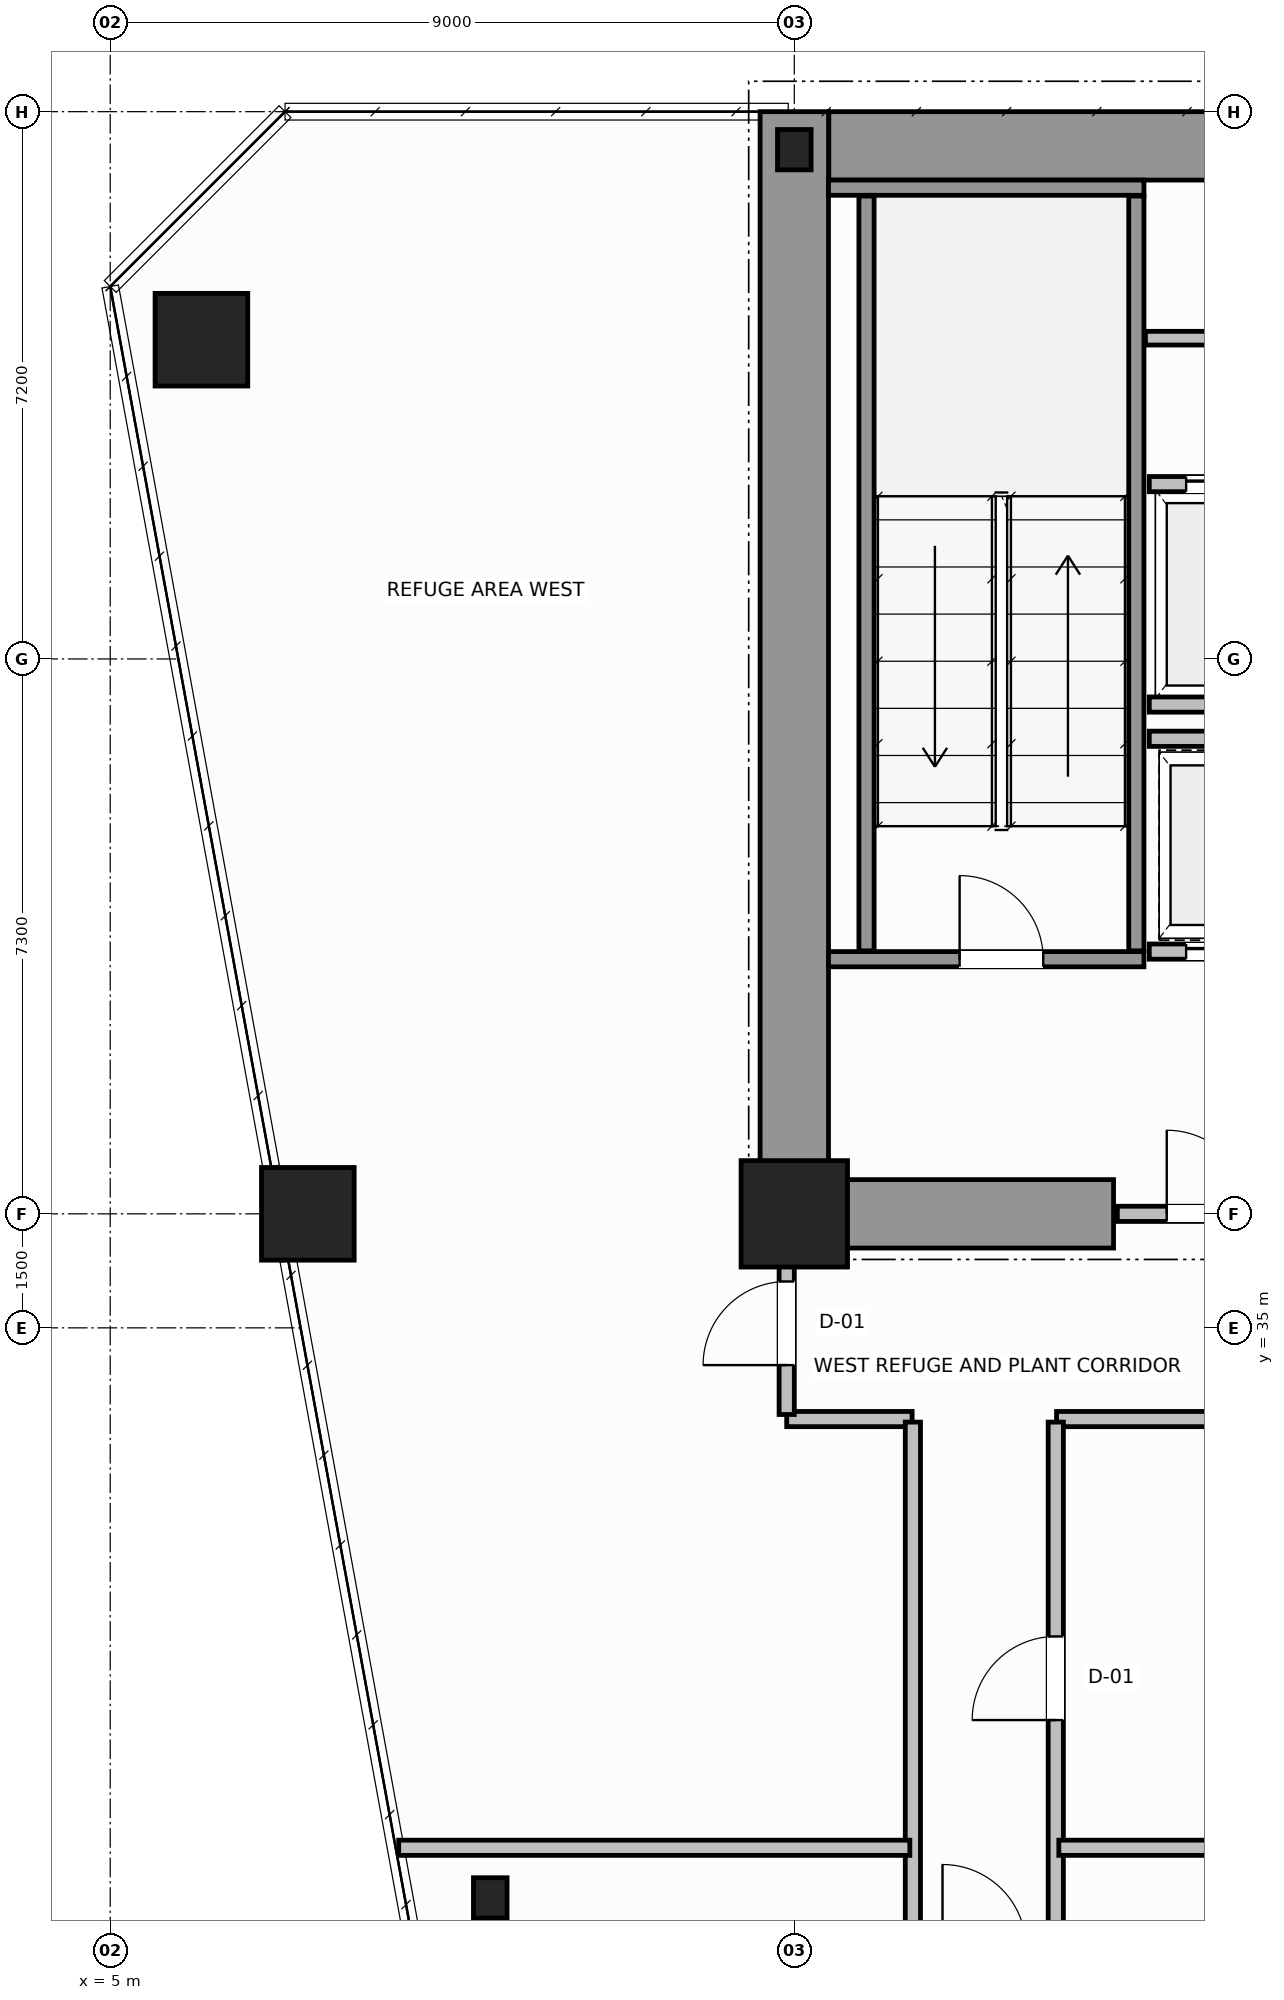
"""IFC4 building model, lengths in metres.
Left out: names, types, materials, properties, quantities, classifications, styles, units other than length and angle.
Written with IfcOpenShell. Run it as: python <this file> out.ifc"""

import sys

from ifc_helpers import new_model, si_unit, direction, frame, frame_2d, origin, origin_2d, place, context, subcontext, project, spatial, rectangle, hollow_circle, i_section, extrude, source, transform, mapped, element, fill, save


model = new_model("IFC4")
c1 = context("Model", 3, precision=1e-05, world=origin(), true_north=direction((0.0, 1.0)))
c2 = subcontext(c1, "Body", "Model", "MODEL_VIEW")
j1 = project(units=[si_unit("LENGTHUNIT", "METRE"), si_unit("PLANEANGLEUNIT", "RADIAN")], contexts=[c1])
p1 = place(None, origin())
s1 = spatial("IfcSite", under=j1, at=p1, CompositionType="ELEMENT")
p2 = place(p1, origin())
s2 = spatial("IfcBuilding", under=s1, at=p2, CompositionType="ELEMENT")
p3 = place(p2, frame((0.0, 0.0, 83.4)))
s3 = spatial("IfcBuildingStorey", under=s2, at=p3, CompositionType="ELEMENT", Elevation=83.4)
m1 = source(origin(), c2, "Body", "SweptSolid", [
    extrude(rectangle(XDim=1.4, YDim=1.4, at=origin_2d()), origin(), (0.0, 0.0, 1.0), 4.8),
])
p4 = place(p3, frame((14.0, 36.5, 0.0), z_axis=(0.0, 0.0, 1.0), x_axis=(1.0, 0.0, 0.0)))
e1 = element("IfcColumn", 1, at=p4, inside=s3, PredefinedType="COLUMN", context=c2, shape_type="MappedRepresentation", body=[
    mapped(m1, transform((0.0, 0.0, 0.0), scale=1.0)),
])
m2 = source(origin(), c2, "Body", "SweptSolid", [
    extrude(i_section(OverallWidth=0.442, OverallDepth=0.531, WebThickness=0.065, FlangeThickness=0.076, FilletRadius=0.015, at=origin_2d()), origin(), (0.0, 0.0, 1.0), 4.8),
])
p5 = place(p3, frame((14.0, 50.5, 0.0), z_axis=(0.0, 0.0, 1.0), x_axis=(1.0, 0.0, 0.0)))
e2 = element("IfcColumn", 2, at=p5, inside=s3, PredefinedType="COLUMN", context=c2, shape_type="MappedRepresentation", body=[
    mapped(m2, transform((0.0, 0.0, 0.0), scale=1.0)),
])
m3 = source(origin(), c2, "Body", "SweptSolid", [
    extrude(hollow_circle(Radius=0.61, WallThickness=0.05, at=origin_2d()), origin(), (0.0, 0.0, 1.0), 4.8),
])
for number, where, z_axis, x_axis in (
    (3, (6.2, 48.0, 0.0), (0.0, 0.0, 1.0), (1.0, 0.0, 0.0)),
    (4, (7.6, 36.5, 0.0), (0.0, 0.0, 1.0), (1.0, 0.0, 0.0)),
):
    element("IfcColumn", number, at=place(p3, frame(where, z_axis=z_axis, x_axis=x_axis)), inside=s3, PredefinedType="COLUMN", context=c2, shape_type="MappedRepresentation", body=[
        mapped(m3, transform((0.0, 0.0, 0.0), scale=1.0)),
    ])
m4 = source(origin(), c2, "Body", "SweptSolid", [
    extrude(i_section(OverallWidth=0.442, OverallDepth=0.531, WebThickness=0.065, FlangeThickness=0.076, FilletRadius=0.015, at=origin_2d()), origin(), (0.0, 0.0, 1.0), 4.8),
])
p6 = place(p3, frame((10.0, 27.5, 0.0), z_axis=(0.0, 0.0, 1.0), x_axis=(1.0, 0.0, 0.0)))
e5 = element("IfcColumn", 5, at=p6, inside=s3, PredefinedType="COLUMN", context=c2, shape_type="MappedRepresentation", body=[
    mapped(m4, transform((0.0, 0.0, 0.0), scale=1.0)),
])
p7 = place(p3, frame((14.454, 50.55, 0.0), z_axis=(0.0, 0.0, 1.0), x_axis=(1.0, 0.0, 0.0)))
e6 = element("IfcWall", 6, at=p7, inside=s3, PredefinedType="SHEAR", context=c2, shape_type="SweptSolid", body=[
    extrude(rectangle(XDim=19.544, YDim=0.9, at=frame_2d((9.772, 0.0))), origin(), (0.0, 0.0, 1.0), 4.8),
])
p8 = place(p3, frame((14.0, 36.5, 0.0), z_axis=(0.0, 0.0, 1.0), x_axis=(0.0, 1.0, 0.0)))
e7 = element("IfcWall", 7, at=p8, inside=s3, PredefinedType="SHEAR", context=c2, shape_type="SweptSolid", body=[
    extrude(rectangle(XDim=14.5, YDim=0.9, at=frame_2d((7.25, 0.0))), origin(), (0.0, 0.0, 1.0), 4.8),
])
p9 = place(p3, frame((14.47, 36.5, 0.0), z_axis=(0.0, 0.0, 1.0), x_axis=(1.0, 0.0, 0.0)))
e8 = element("IfcWall", 8, at=p9, inside=s3, PredefinedType="SHEAR", context=c2, shape_type="SweptSolid", body=[
    extrude(rectangle(XDim=3.73, YDim=0.9, at=frame_2d((1.865, 0.0))), origin(), (0.0, 0.0, 1.0), 3.34),
])
p10 = place(p3, frame((14.45, 39.85, 0.0), z_axis=(0.0, 0.0, 1.0), x_axis=(1.0, 0.0, 0.0)))
e9 = element("IfcWall", 9, at=p10, inside=s3, PredefinedType="SOLIDWALL", context=c2, shape_type="SweptSolid", body=[
    extrude(rectangle(XDim=4.15, YDim=0.2, at=frame_2d((2.075, 0.0))), origin(), (0.0, 0.0, 1.0), 4.8),
])
p11 = place(p10, frame((1.725, 0.0, 0.0)))
e10 = element("IfcOpeningElement", 10, at=p11, cuts=e9, PredefinedType="OPENING", context=c2, shape_type="SweptSolid", body=[
    extrude(rectangle(XDim=1.1, YDim=2.15, at=frame_2d((0.55, 1.075))), frame((0.0, 0.11, 0.0), z_axis=(0.0, -1.0, 0.0), x_axis=(1.0, 0.0, 0.0)), (0.0, 0.0, 1.0), 0.22),
])
p12 = place(p3, frame((14.45, 50.0, 0.0), z_axis=(0.0, 0.0, 1.0), x_axis=(1.0, 0.0, 0.0)))
e11 = element("IfcWall", 11, at=p12, inside=s3, PredefinedType="SOLIDWALL", context=c2, shape_type="SweptSolid", body=[
    extrude(rectangle(XDim=4.15, YDim=0.2, at=frame_2d((2.075, 0.0))), origin(), (0.0, 0.0, 1.0), 4.8),
])
for number, where, z_axis, x_axis in (
    (12, (14.95, 39.96, 0.0), (0.0, 0.0, 1.0), (0.0, 1.0, 0.0)),
    (13, (18.5, 39.96, 0.0), (0.0, 0.0, 1.0), (0.0, 1.0, 0.0)),
):
    element("IfcWall", number, at=place(p3, frame(where, z_axis=z_axis, x_axis=x_axis)), inside=s3, PredefinedType="SOLIDWALL", context=c2, shape_type="SweptSolid", body=[
        extrude(rectangle(XDim=9.93, YDim=0.2, at=frame_2d((4.965, 0.0))), origin(), (0.0, 0.0, 1.0), 4.8),
    ])
p13 = place(p3, frame((18.25, 36.5, 0.0), z_axis=(0.0, 0.0, 1.0), x_axis=(1.0, 0.0, 0.0)))
e14 = element("IfcWall", 14, at=p13, inside=s3, PredefinedType="SOLIDWALL", context=c2, shape_type="SweptSolid", body=[
    extrude(rectangle(XDim=2.47, YDim=0.2, at=frame_2d((1.235, 0.0))), origin(), (0.0, 0.0, 1.0), 3.33),
])
p14 = place(p13, frame((0.65, 0.0, 0.0)))
e15 = element("IfcOpeningElement", 15, at=p14, cuts=e14, PredefinedType="OPENING", context=c2, shape_type="SweptSolid", body=[
    extrude(rectangle(XDim=1.1, YDim=2.15, at=frame_2d((0.55, 1.075))), frame((0.0, 0.11, 0.0), z_axis=(0.0, -1.0, 0.0), x_axis=(1.0, 0.0, 0.0)), (0.0, 0.0, 1.0), 0.22),
])
p15 = place(p3, frame((18.67, 46.1, 0.0), z_axis=(0.0, 0.0, 1.0), x_axis=(1.0, 0.0, 0.0)))
e16 = element("IfcWall", 16, at=p15, inside=s3, PredefinedType="SOLIDWALL", context=c2, shape_type="SweptSolid", body=[
    extrude(rectangle(XDim=2.07, YDim=0.2, at=frame_2d((1.035, 0.0))), origin(), (0.0, 0.0, 1.0), 4.54),
])
p16 = place(p15, frame((0.485, 0.0, 0.0)))
e17 = element("IfcOpeningElement", 17, at=p16, cuts=e16, PredefinedType="OPENING", context=c2, shape_type="SweptSolid", body=[
    extrude(rectangle(XDim=1.1, YDim=2.15, at=frame_2d((0.55, 1.075))), frame((0.0, 0.11, 0.0), z_axis=(0.0, -1.0, 0.0), x_axis=(1.0, 0.0, 0.0)), (0.0, 0.0, 1.0), 0.22),
])
p17 = place(p3, frame((18.67, 43.2, 0.0), z_axis=(0.0, 0.0, 1.0), x_axis=(1.0, 0.0, 0.0)))
e18 = element("IfcWall", 18, at=p17, inside=s3, PredefinedType="SOLIDWALL", context=c2, shape_type="SweptSolid", body=[
    extrude(rectangle(XDim=2.07, YDim=0.2, at=frame_2d((1.035, 0.0))), origin(), (0.0, 0.0, 1.0), 4.54),
])
p18 = place(p3, frame((18.67, 39.95, 0.0), z_axis=(0.0, 0.0, 1.0), x_axis=(1.0, 0.0, 0.0)))
e19 = element("IfcWall", 19, at=p18, inside=s3, PredefinedType="SOLIDWALL", context=c2, shape_type="SweptSolid", body=[
    extrude(rectangle(XDim=2.07, YDim=0.2, at=frame_2d((1.035, 0.0))), origin(), (0.0, 0.0, 1.0), 4.54),
])
p19 = place(p18, frame((0.485, 0.0, 0.0)))
e20 = element("IfcOpeningElement", 20, at=p19, cuts=e19, PredefinedType="OPENING", context=c2, shape_type="SweptSolid", body=[
    extrude(rectangle(XDim=1.1, YDim=2.15, at=frame_2d((0.55, 1.075))), frame((0.0, 0.11, 0.0), z_axis=(0.0, -1.0, 0.0), x_axis=(1.0, 0.0, 0.0)), (0.0, 0.0, 1.0), 0.22),
])
p20 = place(p3, frame((18.67, 42.75, 0.0), z_axis=(0.0, 0.0, 1.0), x_axis=(1.0, 0.0, 0.0)))
e21 = element("IfcWall", 21, at=p20, inside=s3, PredefinedType="SOLIDWALL", context=c2, shape_type="SweptSolid", body=[
    extrude(rectangle(XDim=2.07, YDim=0.2, at=frame_2d((1.035, 0.0))), origin(), (0.0, 0.0, 1.0), 4.54),
])
p21 = place(p3, frame((18.62, 48.02, 0.0), z_axis=(0.0, 0.0, 1.0), x_axis=(1.0, 0.0, 0.0)))
e22 = element("IfcWall", 22, at=p21, inside=s3, PredefinedType="PLUMBINGWALL", context=c2, shape_type="SweptSolid", body=[
    extrude(rectangle(XDim=30.76, YDim=0.18, at=frame_2d((15.38, 0.0))), origin(), (0.0, 0.0, 1.0), 4.54),
])
p22 = place(p21, frame((1.955, 0.0, 0.0)))
e23 = element("IfcOpeningElement", 23, at=p22, cuts=e22, PredefinedType="OPENING", context=c2, shape_type="SweptSolid", body=[
    extrude(rectangle(XDim=0.9, YDim=2.15, at=frame_2d((0.45, 1.075))), frame((0.0, 0.1, 0.0), z_axis=(0.0, -1.0, 0.0), x_axis=(1.0, 0.0, 0.0)), (0.0, 0.0, 1.0), 0.2),
])
p23 = place(p21, frame((8.03, 0.0, 0.0)))
e24 = element("IfcOpeningElement", 24, at=p23, cuts=e22, PredefinedType="OPENING", context=c2, shape_type="SweptSolid", body=[
    extrude(rectangle(XDim=0.9, YDim=2.15, at=frame_2d((0.45, 1.075))), frame((0.0, 0.1, 0.0), z_axis=(0.0, -1.0, 0.0), x_axis=(1.0, 0.0, 0.0)), (0.0, 0.0, 1.0), 0.2),
])
p24 = place(p21, frame((16.93, 0.0, 0.0)))
e25 = element("IfcOpeningElement", 25, at=p24, cuts=e22, PredefinedType="OPENING", context=c2, shape_type="SweptSolid", body=[
    extrude(rectangle(XDim=0.9, YDim=2.15, at=frame_2d((0.45, 1.075))), frame((0.0, 0.1, 0.0), z_axis=(0.0, -1.0, 0.0), x_axis=(1.0, 0.0, 0.0)), (0.0, 0.0, 1.0), 0.2),
])
p25 = place(p21, frame((26.205, 0.0, 0.0)))
e26 = element("IfcOpeningElement", 26, at=p25, cuts=e22, PredefinedType="OPENING", context=c2, shape_type="SweptSolid", body=[
    extrude(rectangle(XDim=0.9, YDim=2.15, at=frame_2d((0.45, 1.075))), frame((0.0, 0.1, 0.0), z_axis=(0.0, -1.0, 0.0), x_axis=(1.0, 0.0, 0.0)), (0.0, 0.0, 1.0), 0.2),
])
p26 = place(p3, frame((13.9, 33.8, 0.0), z_axis=(0.0, 0.0, 1.0), x_axis=(1.0, 0.0, 0.0)))
e27 = element("IfcWall", 27, at=p26, inside=s3, PredefinedType="SOLIDWALL", context=c2, shape_type="SweptSolid", body=[
    extrude(rectangle(XDim=1.65, YDim=0.2, at=frame_2d((0.825, 0.0))), origin(), (0.0, 0.0, 1.0), 4.03),
])
p27 = place(p3, frame((17.45, 33.8, 0.0), z_axis=(0.0, 0.0, 1.0), x_axis=(1.0, 0.0, 0.0)))
e28 = element("IfcWall", 28, at=p27, inside=s3, PredefinedType="SOLIDWALL", context=c2, shape_type="SweptSolid", body=[
    extrude(rectangle(XDim=10.91, YDim=0.2, at=frame_2d((5.455, 0.0))), origin(), (0.0, 0.0, 1.0), 4.03),
])
p28 = place(p27, frame((8.01, 0.0, 0.0)))
e29 = element("IfcOpeningElement", 29, at=p28, cuts=e28, PredefinedType="OPENING", context=c2, shape_type="SweptSolid", body=[
    extrude(rectangle(XDim=1.1, YDim=2.15, at=frame_2d((0.55, 1.075))), frame((0.0, 0.11, 0.0), z_axis=(0.0, -1.0, 0.0), x_axis=(1.0, 0.0, 0.0)), (0.0, 0.0, 1.0), 0.22),
])
p29 = place(p3, frame((13.9, 33.86, 0.0), z_axis=(0.0, 0.0, 1.0), x_axis=(0.0, 1.0, 0.0)))
e30 = element("IfcWall", 30, at=p29, inside=s3, PredefinedType="SOLIDWALL", context=c2, shape_type="SweptSolid", body=[
    extrude(rectangle(XDim=2.58, YDim=0.2, at=frame_2d((1.29, 0.0))), origin(), (0.0, 0.0, 1.0), 4.54),
])
p30 = place(p29, frame((0.65, 0.0, 0.0)))
e31 = element("IfcOpeningElement", 31, at=p30, cuts=e30, PredefinedType="OPENING", context=c2, shape_type="SweptSolid", body=[
    extrude(rectangle(XDim=1.1, YDim=2.15, at=frame_2d((0.55, 1.075))), frame((0.0, 0.11, 0.0), z_axis=(0.0, -1.0, 0.0), x_axis=(1.0, 0.0, 0.0)), (0.0, 0.0, 1.0), 0.22),
])
p31 = place(p3, frame((15.56, 26.84, 0.0), z_axis=(0.0, 0.0, 1.0), x_axis=(0.0, 1.0, 0.0)))
e32 = element("IfcWall", 32, at=p31, inside=s3, PredefinedType="SOLIDWALL", context=c2, shape_type="SweptSolid", body=[
    extrude(rectangle(XDim=6.92, YDim=0.2, at=frame_2d((3.46, 0.0))), origin(), (0.0, 0.0, 1.0), 4.54),
])
p32 = place(p3, frame((17.44, 26.84, 0.0), z_axis=(0.0, 0.0, 1.0), x_axis=(0.0, 1.0, 0.0)))
e33 = element("IfcWall", 33, at=p32, inside=s3, PredefinedType="SOLIDWALL", context=c2, shape_type="SweptSolid", body=[
    extrude(rectangle(XDim=6.92, YDim=0.2, at=frame_2d((3.46, 0.0))), origin(), (0.0, 0.0, 1.0), 4.54),
])
p33 = place(p32, frame((3.0, 0.0, 0.0)))
e34 = element("IfcOpeningElement", 34, at=p33, cuts=e33, PredefinedType="OPENING", context=c2, shape_type="SweptSolid", body=[
    extrude(rectangle(XDim=1.1, YDim=2.15, at=frame_2d((0.55, 1.075))), frame((0.0, 0.11, 0.0), z_axis=(0.0, -1.0, 0.0), x_axis=(1.0, 0.0, 0.0)), (0.0, 0.0, 1.0), 0.22),
])
p34 = place(p3, frame((8.795, 28.16, 0.0), z_axis=(0.0, 0.0, 1.0), x_axis=(1.0, 0.0, 0.0)))
e35 = element("IfcWall", 35, at=p34, inside=s3, PredefinedType="SOLIDWALL", context=c2, shape_type="SweptSolid", body=[
    extrude(rectangle(XDim=6.725, YDim=0.2, at=frame_2d((3.362, 0.0))), origin(), (0.0, 0.0, 1.0), 4.54),
])
p35 = place(p3, frame((17.48, 28.16, 0.0), z_axis=(0.0, 0.0, 1.0), x_axis=(1.0, 0.0, 0.0)))
e36 = element("IfcWall", 36, at=p35, inside=s3, PredefinedType="SOLIDWALL", context=c2, shape_type="SweptSolid", body=[
    extrude(rectangle(XDim=33.04, YDim=0.2, at=frame_2d((16.52, 0.0))), origin(), (0.0, 0.0, 1.0), 4.54),
])
m5 = source(origin(), c2, "Body", "SweptSolid", [
    extrude(rectangle(XDim=1.1, YDim=2.15, at=frame_2d((0.55, 1.075))), frame((0.0, 0.025, 0.0), z_axis=(0.0, -1.0, 0.0), x_axis=(1.0, 0.0, 0.0)), (0.0, 0.0, 1.0), 0.05),
])
p36 = place(p11, origin())
e37 = element("IfcDoor", 37, at=p36, inside=s3, OperationType="SINGLE_SWING_LEFT", PredefinedType="DOOR", context=c2, shape_type="MappedRepresentation", body=[
    mapped(m5, transform((0.0, 0.0, 0.0), scale=1.0)),
])
fill(e10, e37)
p37 = place(p14, origin())
e38 = element("IfcDoor", 38, at=p37, inside=s3, OperationType="SINGLE_SWING_RIGHT", PredefinedType="DOOR", context=c2, shape_type="MappedRepresentation", body=[
    mapped(m5, transform((0.0, 0.0, 0.0), scale=1.0)),
])
fill(e15, e38)
p38 = place(p16, origin())
e39 = element("IfcDoor", 39, at=p38, inside=s3, OperationType="DOUBLE_DOOR_SLIDING", PredefinedType="DOOR", context=c2, shape_type="MappedRepresentation", body=[
    mapped(m5, transform((0.0, 0.0, 0.0), scale=1.0)),
])
fill(e17, e39)
p39 = place(p19, origin())
e40 = element("IfcDoor", 40, at=p39, inside=s3, OperationType="DOUBLE_DOOR_SLIDING", PredefinedType="DOOR", context=c2, shape_type="MappedRepresentation", body=[
    mapped(m5, transform((0.0, 0.0, 0.0), scale=1.0)),
])
fill(e20, e40)
p40 = place(p30, origin())
e41 = element("IfcDoor", 41, at=p40, inside=s3, OperationType="SINGLE_SWING_LEFT", PredefinedType="DOOR", context=c2, shape_type="MappedRepresentation", body=[
    mapped(m5, transform((0.0, 0.0, 0.0), scale=1.0)),
])
fill(e31, e41)
p41 = place(p33, origin())
e42 = element("IfcDoor", 42, at=p41, inside=s3, OperationType="SINGLE_SWING_RIGHT", PredefinedType="DOOR", context=c2, shape_type="MappedRepresentation", body=[
    mapped(m5, transform((0.0, 0.0, 0.0), scale=1.0)),
])
fill(e34, e42)
save(model, sys.argv[1])
